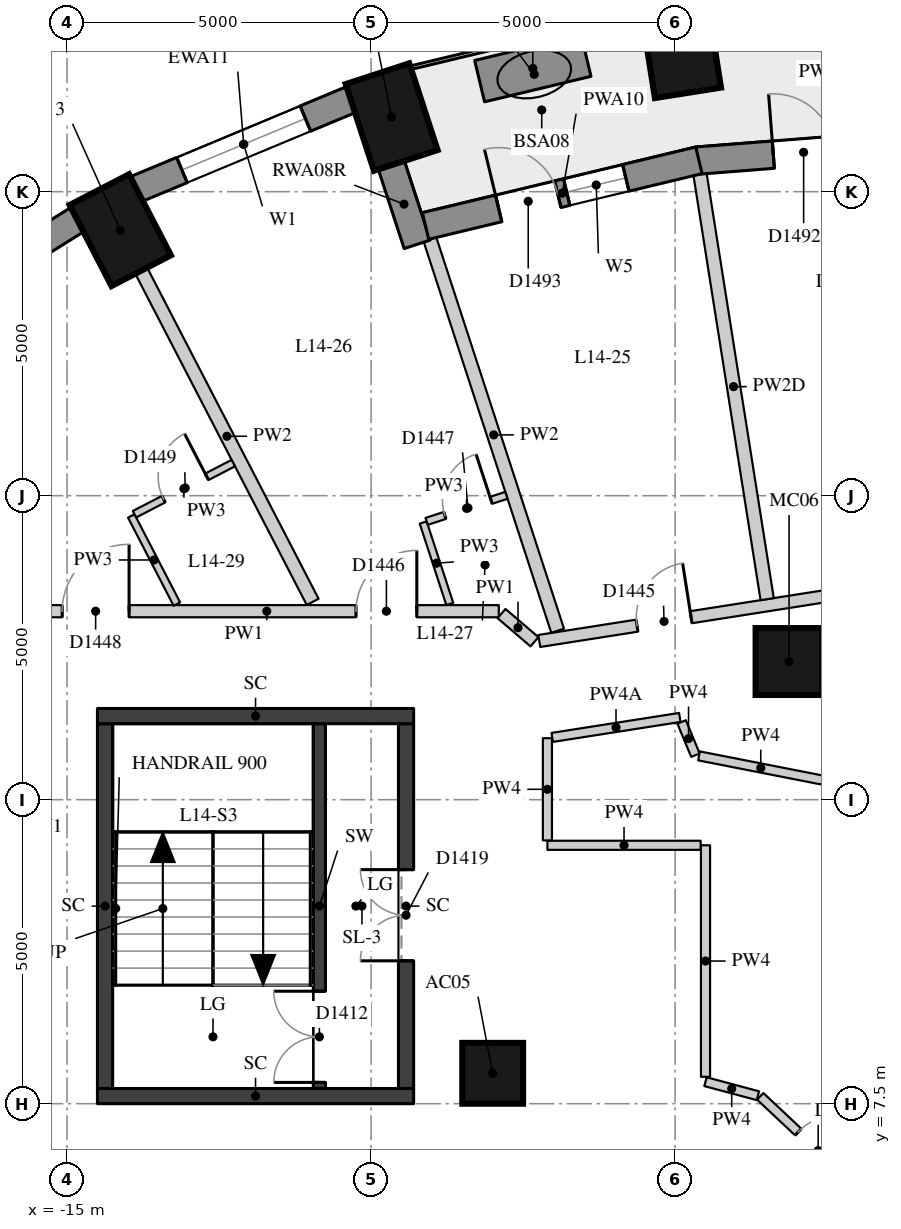
"""IFC4 building model, lengths in metres.
Left out: names, types, materials, properties, quantities, classifications, styles, units other than length and angle.
Written with IfcOpenShell. Run it as: python <this file> out.ifc"""

import sys

from ifc_helpers import new_model, si_unit, direction, frame, frame_2d, origin, origin_2d, place, context, subcontext, project, spatial, rectangle, extrude, element, fill, save


model = new_model("IFC4")
c1 = context("Model", 3, precision=1e-05, world=origin(), true_north=direction((0.0, 1.0)))
c2 = subcontext(c1, "Body", "Model", "MODEL_VIEW")
j1 = project(units=[si_unit("LENGTHUNIT", "METRE"), si_unit("PLANEANGLEUNIT", "RADIAN")], contexts=[c1])
p1 = place(None, origin())
s1 = spatial("IfcSite", under=j1, at=p1, CompositionType="ELEMENT")
p2 = place(p1, origin())
s2 = spatial("IfcBuilding", under=s1, at=p2, CompositionType="ELEMENT")
p3 = place(p2, frame((0.0, 0.0, 54.7)))
s3 = spatial("IfcBuildingStorey", under=s2, at=p3, CompositionType="ELEMENT", Elevation=54.7)
for number, where, z_axis, x_axis in (
    (1, (-4.906, 24.866, 0.0), (0.0, 0.0, 1.0), (-0.156, 0.988, 0.0)),
    (2, (-9.662, 23.727, 0.0), (0.0, 0.0, 1.0), (-0.31, 0.951, 0.0)),
    (3, (-14.125, 21.867, 0.0), (0.0, 0.0, 1.0), (-0.46, 0.888, 0.0)),
):
    element("IfcColumn", number, at=place(p3, frame(where, z_axis=z_axis, x_axis=x_axis)), inside=s3, PredefinedType="COLUMN", context=c2, shape_type="SweptSolid", body=[
        extrude(rectangle(XDim=1.5, YDim=1.1, at=origin_2d()), origin(), (0.0, 0.0, 1.0), 3.3),
    ])
p4 = place(p3, frame((-8.0, 8.0, 0.0), z_axis=(0.0, 0.0, 1.0), x_axis=(1.0, 0.0, 0.0)))
e4 = element("IfcColumn", 4, at=p4, inside=s3, PredefinedType="COLUMN", context=c2, shape_type="SweptSolid", body=[
    extrude(rectangle(XDim=1.0, YDim=1.0, at=origin_2d()), origin(), (0.0, 0.0, 1.0), 3.3),
])
p5 = place(p3, frame((-3.126, 14.772, 0.0), z_axis=(0.0, 0.0, 1.0), x_axis=(1.0, 0.0, 0.0)))
e5 = element("IfcColumn", 5, at=p5, inside=s3, PredefinedType="COLUMN", context=c2, shape_type="SweptSolid", body=[
    extrude(rectangle(XDim=1.1, YDim=1.1, at=origin_2d()), origin(), (0.0, 0.0, 1.0), 3.3),
])
p6 = place(p3, frame((-10.315, 24.021, 0.0), z_axis=(0.0, 0.0, 1.0), x_axis=(-0.923031964282, -0.384723267966, 0.0)))
e6 = element("IfcWall", 6, at=p6, inside=s3, PredefinedType="SOLIDWALL", context=c2, shape_type="SweptSolid", body=[
    extrude(rectangle(XDim=3.856, YDim=0.45, at=frame_2d((1.928, 0.0))), origin(), (0.0, 0.0, 1.0), 3.02),
])
p7 = place(p6, frame((0.828, 0.0, 0.4)))
e7 = element("IfcOpeningElement", 7, at=p7, cuts=e6, PredefinedType="OPENING", context=c2, shape_type="SweptSolid", body=[
    extrude(rectangle(XDim=2.2, YDim=1.75, at=frame_2d((1.1, 0.875))), frame((0.0, 0.235, 0.0), z_axis=(0.0, -1.0, 0.0), x_axis=(1.0, 0.0, 0.0)), (0.0, 0.0, 1.0), 0.47),
])
p8 = place(p3, frame((-14.817, 22.051, 0.0), z_axis=(0.0, 0.0, 1.0), x_axis=(-0.847635480093, -0.530579016629, 0.0)))
e8 = element("IfcWall", 8, at=p8, inside=s3, PredefinedType="SOLIDWALL", context=c2, shape_type="SweptSolid", body=[
    extrude(rectangle(XDim=3.782, YDim=0.45, at=frame_2d((1.891, 0.0))), origin(), (0.0, 0.0, 1.0), 3.02),
])
p9 = place(p8, frame((0.791, 0.0, 0.4)))
e9 = element("IfcOpeningElement", 9, at=p9, cuts=e8, PredefinedType="OPENING", context=c2, shape_type="SweptSolid", body=[
    extrude(rectangle(XDim=2.2, YDim=1.75, at=frame_2d((1.1, 0.875))), frame((0.0, 0.235, 0.0), z_axis=(0.0, -1.0, 0.0), x_axis=(1.0, 0.0, 0.0)), (0.0, 0.0, 1.0), 0.47),
])
p10 = place(p3, frame((-9.674, 22.956, 0.0), z_axis=(0.0, 0.0, 1.0), x_axis=(0.310269011655, -0.950648799719, 0.0)))
e10 = element("IfcWall", 10, at=p10, inside=s3, PredefinedType="SOLIDWALL", context=c2, shape_type="SweptSolid", body=[
    extrude(rectangle(XDim=1.39, YDim=0.45, at=frame_2d((0.695, 0.0))), origin(), (0.0, 0.0, 1.0), 3.02),
])
p11 = place(p3, frame((0.018, 23.376, 0.0), z_axis=(0.0, 0.0, 1.0), x_axis=(-0.996935982964, -0.078221773648, 0.0)))
e11 = element("IfcWall", 11, at=p11, inside=s3, PredefinedType="SOLIDWALL", context=c2, shape_type="SweptSolid", body=[
    extrude(rectangle(XDim=4.676, YDim=0.45, at=frame_2d((2.338, 0.0))), origin(), (0.0, 0.0, 1.0), 3.02),
])
p12 = place(p11, frame((1.263, 0.0, 0.4)))
e12 = element("IfcOpeningElement", 12, at=p12, cuts=e11, PredefinedType="OPENING", context=c2, shape_type="SweptSolid", body=[
    extrude(rectangle(XDim=1.0, YDim=1.75, at=frame_2d((0.5, 0.875))), frame((0.0, 0.235, 0.0), z_axis=(0.0, -1.0, 0.0), x_axis=(1.0, 0.0, 0.0)), (0.0, 0.0, 1.0), 0.47),
])
p13 = place(p11, frame((2.413, 0.0, 0.0)))
e13 = element("IfcOpeningElement", 13, at=p13, cuts=e11, PredefinedType="OPENING", context=c2, shape_type="SweptSolid", body=[
    extrude(rectangle(XDim=1.0, YDim=2.15, at=frame_2d((0.5, 1.075))), frame((0.0, 0.235, 0.0), z_axis=(0.0, -1.0, 0.0), x_axis=(1.0, 0.0, 0.0)), (0.0, 0.0, 1.0), 0.47),
])
p14 = place(p3, frame((-4.608, 23.016, 0.0), z_axis=(0.0, 0.0, 1.0), x_axis=(-0.972343667289, -0.233554688847, 0.0)))
e14 = element("IfcWall", 14, at=p14, inside=s3, PredefinedType="SOLIDWALL", context=c2, shape_type="SweptSolid", body=[
    extrude(rectangle(XDim=4.624, YDim=0.45, at=frame_2d((2.312, 0.0))), origin(), (0.0, 0.0, 1.0), 3.02),
])
p15 = place(p14, frame((1.237, 0.0, 0.4)))
e15 = element("IfcOpeningElement", 15, at=p15, cuts=e14, PredefinedType="OPENING", context=c2, shape_type="SweptSolid", body=[
    extrude(rectangle(XDim=1.0, YDim=1.75, at=frame_2d((0.5, 0.875))), frame((0.0, 0.235, 0.0), z_axis=(0.0, -1.0, 0.0), x_axis=(1.0, 0.0, 0.0)), (0.0, 0.0, 1.0), 0.47),
])
p16 = place(p14, frame((2.387, 0.0, 0.0)))
e16 = element("IfcOpeningElement", 16, at=p16, cuts=e14, PredefinedType="OPENING", context=c2, shape_type="SweptSolid", body=[
    extrude(rectangle(XDim=1.0, YDim=2.15, at=frame_2d((0.5, 1.075))), frame((0.0, 0.235, 0.0), z_axis=(0.0, -1.0, 0.0), x_axis=(1.0, 0.0, 0.0)), (0.0, 0.0, 1.0), 0.47),
])
p17 = place(p3, frame((-6.465, 24.737, 0.0), z_axis=(0.0, 0.0, 1.0), x_axis=(-0.972504142103, -0.232885580473, 0.0)))
e17 = element("IfcWall", 17, at=p17, inside=s3, PredefinedType="USERDEFINED", context=c2, shape_type="SweptSolid", body=[
    extrude(rectangle(XDim=1.8, YDim=0.7, at=frame_2d((0.9, 0.0))), origin(), (0.0, 0.0, 1.0), 0.75),
])
p18 = place(p3, frame((-10.85, 7.75, 0.0), z_axis=(0.0, 0.0, 1.0), x_axis=(0.0, 1.0, 0.0)))
e18 = element("IfcWall", 18, at=p18, inside=s3, PredefinedType="SHEAR", context=c2, shape_type="SweptSolid", body=[
    extrude(rectangle(XDim=6.0, YDim=0.2, at=frame_2d((3.0, 0.0))), origin(), (0.0, 0.0, 1.0), 3.02),
])
p19 = place(p18, frame((0.1, 0.0, 0.0)))
e19 = element("IfcOpeningElement", 19, at=p19, cuts=e18, PredefinedType="OPENING", context=c2, shape_type="SweptSolid", body=[
    extrude(rectangle(XDim=1.5, YDim=2.1, at=frame_2d((0.75, 1.05))), frame((0.0, 0.11, 0.0), z_axis=(0.0, -1.0, 0.0), x_axis=(1.0, 0.0, 0.0)), (0.0, 0.0, 1.0), 0.22),
])
p20 = place(p3, frame((-14.375, 7.75, -0.28), z_axis=(0.0, 0.0, 1.0), x_axis=(0.0, 1.0, 0.0)))
e20 = element("IfcWall", 20, at=p20, inside=s3, PredefinedType="SHEAR", context=c2, shape_type="SweptSolid", body=[
    extrude(rectangle(XDim=6.0, YDim=0.25, at=frame_2d((3.0, 0.0))), origin(), (0.0, 0.0, 1.0), 3.3),
])
p21 = place(p3, frame((-9.425, 7.75, -0.28), z_axis=(0.0, 0.0, 1.0), x_axis=(0.0, 1.0, 0.0)))
e21 = element("IfcWall", 21, at=p21, inside=s3, PredefinedType="SHEAR", context=c2, shape_type="SweptSolid", body=[
    extrude(rectangle(XDim=6.0, YDim=0.25, at=frame_2d((3.0, 0.0))), origin(), (0.0, 0.0, 1.0), 3.3),
])
p22 = place(p21, frame((2.1, 0.0, 0.28)))
e22 = element("IfcOpeningElement", 22, at=p22, cuts=e21, PredefinedType="OPENING", context=c2, shape_type="SweptSolid", body=[
    extrude(rectangle(XDim=1.5, YDim=2.1, at=frame_2d((0.75, 1.05))), frame((0.0, 0.135, 0.0), z_axis=(0.0, -1.0, 0.0), x_axis=(1.0, 0.0, 0.0)), (0.0, 0.0, 1.0), 0.27),
])
for number, where, z_axis, x_axis in (
    (23, (-14.5, 13.875, -0.28), (0.0, 0.0, 1.0), (1.0, 0.0, 0.0)),
    (24, (-14.5, 7.625, -0.28), (0.0, 0.0, 1.0), (1.0, 0.0, 0.0)),
):
    element("IfcWall", number, at=place(p3, frame(where, z_axis=z_axis, x_axis=x_axis)), inside=s3, PredefinedType="SHEAR", context=c2, shape_type="SweptSolid", body=[
        extrude(rectangle(XDim=5.2, YDim=0.25, at=frame_2d((2.6, 0.0))), origin(), (0.0, 0.0, 1.0), 3.3),
    ])
p23 = place(p3, frame((-15.531, 15.6, 0.0), z_axis=(0.0, 0.0, 1.0), x_axis=(1.0, 0.0, 0.0)))
e25 = element("IfcWall", 25, at=p23, inside=s3, PredefinedType="PARTITIONING", context=c2, shape_type="SweptSolid", body=[
    extrude(rectangle(XDim=7.632, YDim=0.2, at=frame_2d((3.816, 0.0))), origin(), (0.0, 0.0, 1.0), 3.02),
])
p24 = place(p23, frame((5.283, 0.0, 0.0)))
e26 = element("IfcOpeningElement", 26, at=p24, cuts=e25, PredefinedType="OPENING", context=c2, shape_type="SweptSolid", body=[
    extrude(rectangle(XDim=1.0, YDim=2.1, at=frame_2d((0.5, 1.05))), frame((0.0, 0.11, 0.0), z_axis=(0.0, -1.0, 0.0), x_axis=(1.0, 0.0, 0.0)), (0.0, 0.0, 1.0), 0.22),
])
p25 = place(p23, frame((0.451, 0.0, 0.0)))
e27 = element("IfcOpeningElement", 27, at=p25, cuts=e25, PredefinedType="OPENING", context=c2, shape_type="SweptSolid", body=[
    extrude(rectangle(XDim=1.1, YDim=2.1, at=frame_2d((0.55, 1.05))), frame((0.0, 0.11, 0.0), z_axis=(0.0, -1.0, 0.0), x_axis=(1.0, 0.0, 0.0)), (0.0, 0.0, 1.0), 0.22),
])
p26 = place(p3, frame((-7.854, 15.561, 0.0), z_axis=(0.0, 0.0, 1.0), x_axis=(0.759763914627, -0.650199041856, 0.0)))
e28 = element("IfcWall", 28, at=p26, inside=s3, PredefinedType="PARTITIONING", context=c2, shape_type="SweptSolid", body=[
    extrude(rectangle(XDim=0.713, YDim=0.2, at=frame_2d((0.356, 0.0))), origin(), (0.0, 0.0, 1.0), 3.02),
])
p27 = place(p3, frame((-7.234, 15.11, 0.0), z_axis=(0.0, 0.0, 1.0), x_axis=(0.987957763282, 0.154723811906, 0.0)))
e29 = element("IfcWall", 29, at=p27, inside=s3, PredefinedType="PARTITIONING", context=c2, shape_type="SweptSolid", body=[
    extrude(rectangle(XDim=11.012, YDim=0.2, at=frame_2d((5.506, 0.0))), origin(), (0.0, 0.0, 1.0), 3.02),
])
p28 = place(p27, frame((8.605, 0.0, 0.0)))
e30 = element("IfcOpeningElement", 30, at=p28, cuts=e29, PredefinedType="OPENING", context=c2, shape_type="SweptSolid", body=[
    extrude(rectangle(XDim=0.9, YDim=2.1, at=frame_2d((0.45, 1.05))), frame((0.0, 0.11, 0.0), z_axis=(0.0, -1.0, 0.0), x_axis=(1.0, 0.0, 0.0)), (0.0, 0.0, 1.0), 0.22),
])
p29 = place(p27, frame((5.116, 0.0, 0.0)))
e31 = element("IfcOpeningElement", 31, at=p29, cuts=e29, PredefinedType="OPENING", context=c2, shape_type="SweptSolid", body=[
    extrude(rectangle(XDim=0.9, YDim=2.1, at=frame_2d((0.45, 1.05))), frame((0.0, 0.11, 0.0), z_axis=(0.0, -1.0, 0.0), x_axis=(1.0, 0.0, 0.0)), (0.0, 0.0, 1.0), 0.22),
])
p30 = place(p27, frame((1.626, 0.0, 0.0)))
e32 = element("IfcOpeningElement", 32, at=p30, cuts=e29, PredefinedType="OPENING", context=c2, shape_type="SweptSolid", body=[
    extrude(rectangle(XDim=0.9, YDim=2.1, at=frame_2d((0.45, 1.05))), frame((0.0, 0.11, 0.0), z_axis=(0.0, -1.0, 0.0), x_axis=(1.0, 0.0, 0.0)), (0.0, 0.0, 1.0), 0.22),
])
p31 = place(p3, frame((-1.694, 5.832, 0.0), z_axis=(0.0, 0.0, 1.0), x_axis=(-0.729170056034, 0.684332542981, 0.0)))
e33 = element("IfcWall", 33, at=p31, inside=s3, PredefinedType="PARTITIONING", context=c2, shape_type="SweptSolid", body=[
    extrude(rectangle(XDim=2.614, YDim=0.15, at=frame_2d((1.307, 0.0))), origin(), (0.0, 0.0, 1.0), 3.02),
])
p32 = place(p31, frame((0.857, 0.0, 0.0)))
e34 = element("IfcOpeningElement", 34, at=p32, cuts=e33, PredefinedType="OPENING", context=c2, shape_type="SweptSolid", body=[
    extrude(rectangle(XDim=0.9, YDim=2.1, at=frame_2d((0.45, 1.05))), frame((0.0, 0.085, 0.0), z_axis=(0.0, -1.0, 0.0), x_axis=(1.0, 0.0, 0.0)), (0.0, 0.0, 1.0), 0.17),
])
p33 = place(p3, frame((-3.639, 7.631, 0.0), z_axis=(0.0, 0.0, 1.0), x_axis=(-0.965879594242, 0.258991523853, 0.0)))
e35 = element("IfcWall", 35, at=p33, inside=s3, PredefinedType="PARTITIONING", context=c2, shape_type="SweptSolid", body=[
    extrude(rectangle(XDim=0.892, YDim=0.15, at=frame_2d((0.446, 0.0))), origin(), (0.0, 0.0, 1.0), 3.02),
])
p34 = place(p3, frame((-4.5, 7.942, 0.0), z_axis=(0.0, 0.0, 1.0), x_axis=(0.0, 1.0, 0.0)))
e36 = element("IfcWall", 36, at=p34, inside=s3, PredefinedType="PARTITIONING", context=c2, shape_type="SweptSolid", body=[
    extrude(rectangle(XDim=3.808, YDim=0.15, at=frame_2d((1.904, 0.0))), origin(), (0.0, 0.0, 1.0), 3.02),
])
p35 = place(p3, frame((-4.58, 11.75, 0.0), z_axis=(0.0, 0.0, 1.0), x_axis=(-1.0, 0.0, 0.0)))
e37 = element("IfcWall", 37, at=p35, inside=s3, PredefinedType="PARTITIONING", context=c2, shape_type="SweptSolid", body=[
    extrude(rectangle(XDim=2.52, YDim=0.15, at=frame_2d((1.26, 0.0))), origin(), (0.0, 0.0, 1.0), 3.02),
])
p36 = place(p3, frame((-7.1, 11.83, 0.0), z_axis=(0.0, 0.0, 1.0), x_axis=(0.0, 1.0, 0.0)))
e38 = element("IfcWall", 38, at=p36, inside=s3, PredefinedType="PARTITIONING", context=c2, shape_type="SweptSolid", body=[
    extrude(rectangle(XDim=1.681, YDim=0.15, at=frame_2d((0.841, 0.0))), origin(), (0.0, 0.0, 1.0), 3.02),
])
p37 = place(p3, frame((-7.021, 13.524, 0.0), z_axis=(0.0, 0.0, 1.0), x_axis=(0.987976394461, 0.154604799366, 0.0)))
e39 = element("IfcWall", 39, at=p37, inside=s3, PredefinedType="PARTITIONING", context=c2, shape_type="SweptSolid", body=[
    extrude(rectangle(XDim=2.124, YDim=0.15, at=frame_2d((1.062, 0.0))), origin(), (0.0, 0.0, 1.0), 2.57),
])
p38 = place(p3, frame((-4.892, 13.778, 0.0), z_axis=(0.0, 0.0, 1.0), x_axis=(0.383178293395, -0.923674399056, 0.0)))
e40 = element("IfcWall", 40, at=p38, inside=s3, PredefinedType="PARTITIONING", context=c2, shape_type="SweptSolid", body=[
    extrude(rectangle(XDim=0.591, YDim=0.15, at=frame_2d((0.296, 0.0))), origin(), (0.0, 0.0, 1.0), 3.02),
])
p39 = place(p3, frame((-4.607, 13.22, 0.0), z_axis=(0.0, 0.0, 1.0), x_axis=(0.981304142817, -0.192463449234, 0.0)))
e41 = element("IfcWall", 41, at=p39, inside=s3, PredefinedType="PARTITIONING", context=c2, shape_type="SweptSolid", body=[
    extrude(rectangle(XDim=2.07, YDim=0.15, at=frame_2d((1.035, 0.0))), origin(), (0.0, 0.0, 1.0), 3.02),
])
p40 = place(p3, frame((-4.591, 22.789, 0.0), z_axis=(0.0, 0.0, 1.0), x_axis=(0.15613617795, -0.987735538459, 0.0)))
e42 = element("IfcWall", 42, at=p40, inside=s3, PredefinedType="PARTITIONING", context=c2, shape_type="SweptSolid", body=[
    extrude(rectangle(XDim=7.077, YDim=0.22, at=frame_2d((3.539, 0.0))), origin(), (0.0, 0.0, 1.0), 2.47),
])
p41 = place(p3, frame((-9.034, 21.721, 0.0), z_axis=(0.0, 0.0, 1.0), x_axis=(0.310212430052, -0.950667264736, 0.0)))
e43 = element("IfcWall", 43, at=p41, inside=s3, PredefinedType="PARTITIONING", context=c2, shape_type="SweptSolid", body=[
    extrude(rectangle(XDim=6.777, YDim=0.22, at=frame_2d((3.388, 0.0))), origin(), (0.0, 0.0, 1.0), 3.02),
])
p42 = place(p3, frame((-13.78, 21.201, 0.0), z_axis=(0.0, 0.0, 1.0), x_axis=(0.459699000582, -0.888074787878, 0.0)))
e44 = element("IfcWall", 44, at=p42, inside=s3, PredefinedType="PARTITIONING", context=c2, shape_type="SweptSolid", body=[
    extrude(rectangle(XDim=6.134, YDim=0.22, at=frame_2d((3.067, 0.0))), origin(), (0.0, 0.0, 1.0), 3.02),
])
p43 = place(p3, frame((-8.706, 15.719, 0.0), z_axis=(0.0, 0.0, 1.0), x_axis=(-0.310245242974, 0.950656556918, 0.0)))
e45 = element("IfcWall", 45, at=p43, inside=s3, PredefinedType="PARTITIONING", context=c2, shape_type="SweptSolid", body=[
    extrude(rectangle(XDim=1.409, YDim=0.12, at=frame_2d((0.705, 0.0))), origin(), (0.0, 0.0, 1.0), 3.02),
])
p44 = place(p3, frame((-13.194, 15.718, 0.0), z_axis=(0.0, 0.0, 1.0), x_axis=(-0.459736274936, 0.888055492359, 0.0)))
e46 = element("IfcWall", 46, at=p44, inside=s3, PredefinedType="PARTITIONING", context=c2, shape_type="SweptSolid", body=[
    extrude(rectangle(XDim=1.632, YDim=0.12, at=frame_2d((0.816, 0.0))), origin(), (0.0, 0.0, 1.0), 3.02),
])
p45 = place(p3, frame((-9.086, 17.077, 0.0), z_axis=(0.0, 0.0, 1.0), x_axis=(0.950576687533, 0.310489872812, 0.0)))
e47 = element("IfcWall", 47, at=p45, inside=s3, PredefinedType="PARTITIONING", context=c2, shape_type="SweptSolid", body=[
    extrude(rectangle(XDim=1.38, YDim=0.12, at=frame_2d((0.69, 0.0))), origin(), (0.0, 0.0, 1.0), 3.02),
])
p46 = place(p45, frame((0.315, 0.0, 0.0)))
e48 = element("IfcOpeningElement", 48, at=p46, cuts=e47, PredefinedType="OPENING", context=c2, shape_type="SweptSolid", body=[
    extrude(rectangle(XDim=0.8, YDim=2.1, at=frame_2d((0.4, 1.05))), frame((0.0, 0.07, 0.0), z_axis=(0.0, -1.0, 0.0), x_axis=(1.0, 0.0, 0.0)), (0.0, 0.0, 1.0), 0.14),
])
p47 = place(p3, frame((-13.891, 17.195, 0.0), z_axis=(0.0, 0.0, 1.0), x_axis=(0.88806930088, 0.459709600546, 0.0)))
e49 = element("IfcWall", 49, at=p47, inside=s3, PredefinedType="PARTITIONING", context=c2, shape_type="SweptSolid", body=[
    extrude(rectangle(XDim=1.83, YDim=0.12, at=frame_2d((0.915, 0.0))), origin(), (0.0, 0.0, 1.0), 3.02),
])
p48 = place(p47, frame((0.54, 0.0, 0.0)))
e50 = element("IfcOpeningElement", 50, at=p48, cuts=e49, PredefinedType="OPENING", context=c2, shape_type="SweptSolid", body=[
    extrude(rectangle(XDim=0.8, YDim=2.1, at=frame_2d((0.4, 1.05))), frame((0.0, 0.07, 0.0), z_axis=(0.0, -1.0, 0.0), x_axis=(1.0, 0.0, 0.0)), (0.0, 0.0, 1.0), 0.14),
])
p49 = place(p7, origin())
e51 = element("IfcWindow", 51, at=p49, inside=s3, PartitioningType="SINGLE_PANEL", PredefinedType="WINDOW", context=c2, shape_type="SweptSolid", body=[
    extrude(rectangle(XDim=2.2, YDim=1.75, at=frame_2d((1.1, 0.875))), frame((0.0, 0.035, 0.0), z_axis=(0.0, -1.0, 0.0), x_axis=(1.0, 0.0, 0.0)), (0.0, 0.0, 1.0), 0.06),
])
fill(e7, e51)
p50 = place(p13, frame((1.0, 0.0, 0.0), z_axis=(0.0, 0.0, 1.0), x_axis=(-1.0, 0.0, 0.0)))
e52 = element("IfcDoor", 52, at=p50, inside=s3, OperationType="SINGLE_SWING_LEFT", PredefinedType="DOOR", context=c2, shape_type="SweptSolid", body=[
    extrude(rectangle(XDim=1.0, YDim=2.15, at=frame_2d((0.5, 1.075))), frame((0.0, 0.075, 0.0), z_axis=(0.0, -1.0, 0.0), x_axis=(1.0, 0.0, 0.0)), (0.0, 0.0, 1.0), 0.05),
])
fill(e13, e52)
p51 = place(p15, origin())
e53 = element("IfcWindow", 53, at=p51, inside=s3, PartitioningType="SINGLE_PANEL", PredefinedType="WINDOW", context=c2, shape_type="SweptSolid", body=[
    extrude(rectangle(XDim=1.0, YDim=1.75, at=frame_2d((0.5, 0.875))), frame((0.0, 0.035, 0.0), z_axis=(0.0, -1.0, 0.0), x_axis=(1.0, 0.0, 0.0)), (0.0, 0.0, 1.0), 0.06),
])
fill(e15, e53)
p52 = place(p16, frame((1.0, 0.0, 0.0), z_axis=(0.0, 0.0, 1.0), x_axis=(-1.0, 0.0, 0.0)))
e54 = element("IfcDoor", 54, at=p52, inside=s3, OperationType="SINGLE_SWING_LEFT", PredefinedType="DOOR", context=c2, shape_type="SweptSolid", body=[
    extrude(rectangle(XDim=1.0, YDim=2.15, at=frame_2d((0.5, 1.075))), frame((0.0, 0.075, 0.0), z_axis=(0.0, -1.0, 0.0), x_axis=(1.0, 0.0, 0.0)), (0.0, 0.0, 1.0), 0.05),
])
fill(e16, e54)
p53 = place(p19, origin())
e55 = element("IfcDoor", 55, at=p53, inside=s3, OperationType="DOUBLE_DOOR_SINGLE_SWING", PredefinedType="DOOR", context=c2, shape_type="SweptSolid", body=[
    extrude(rectangle(XDim=1.5, YDim=2.1, at=frame_2d((0.75, 1.05))), frame((0.0, 0.025, 0.0), z_axis=(0.0, -1.0, 0.0), x_axis=(1.0, 0.0, 0.0)), (0.0, 0.0, 1.0), 0.05),
])
fill(e19, e55)
p54 = place(p22, origin())
e56 = element("IfcDoor", 56, at=p54, inside=s3, OperationType="DOUBLE_DOOR_SINGLE_SWING", PredefinedType="DOOR", context=c2, shape_type="SweptSolid", body=[
    extrude(rectangle(XDim=1.5, YDim=2.1, at=frame_2d((0.75, 1.05))), frame((0.0, 0.025, 0.0), z_axis=(0.0, -1.0, 0.0), x_axis=(1.0, 0.0, 0.0)), (0.0, 0.0, 1.0), 0.05),
])
fill(e22, e56)
p55 = place(p30, origin())
e57 = element("IfcDoor", 57, at=p55, inside=s3, OperationType="SINGLE_SWING_RIGHT", PredefinedType="DOOR", context=c2, shape_type="SweptSolid", body=[
    extrude(rectangle(XDim=0.9, YDim=2.1, at=frame_2d((0.45, 1.05))), frame((0.0, 0.025, 0.0), z_axis=(0.0, -1.0, 0.0), x_axis=(1.0, 0.0, 0.0)), (0.0, 0.0, 1.0), 0.05),
])
fill(e32, e57)
p56 = place(p24, origin())
e58 = element("IfcDoor", 58, at=p56, inside=s3, OperationType="SINGLE_SWING_RIGHT", PredefinedType="DOOR", context=c2, shape_type="SweptSolid", body=[
    extrude(rectangle(XDim=1.0, YDim=2.1, at=frame_2d((0.5, 1.05))), frame((0.0, 0.025, 0.0), z_axis=(0.0, -1.0, 0.0), x_axis=(1.0, 0.0, 0.0)), (0.0, 0.0, 1.0), 0.05),
])
fill(e26, e58)
p57 = place(p46, origin())
e59 = element("IfcDoor", 59, at=p57, inside=s3, OperationType="SINGLE_SWING_RIGHT", PredefinedType="DOOR", context=c2, shape_type="SweptSolid", body=[
    extrude(rectangle(XDim=0.8, YDim=2.1, at=frame_2d((0.4, 1.05))), frame((0.0, 0.025, 0.0), z_axis=(0.0, -1.0, 0.0), x_axis=(1.0, 0.0, 0.0)), (0.0, 0.0, 1.0), 0.05),
])
fill(e48, e59)
p58 = place(p25, origin())
e60 = element("IfcDoor", 60, at=p58, inside=s3, OperationType="SINGLE_SWING_RIGHT", PredefinedType="DOOR", context=c2, shape_type="SweptSolid", body=[
    extrude(rectangle(XDim=1.1, YDim=2.1, at=frame_2d((0.55, 1.05))), frame((0.0, 0.025, 0.0), z_axis=(0.0, -1.0, 0.0), x_axis=(1.0, 0.0, 0.0)), (0.0, 0.0, 1.0), 0.05),
])
fill(e27, e60)
p59 = place(p48, origin())
e61 = element("IfcDoor", 61, at=p59, inside=s3, OperationType="SINGLE_SWING_RIGHT", PredefinedType="DOOR", context=c2, shape_type="SweptSolid", body=[
    extrude(rectangle(XDim=0.8, YDim=2.1, at=frame_2d((0.4, 1.05))), frame((0.0, 0.025, 0.0), z_axis=(0.0, -1.0, 0.0), x_axis=(1.0, 0.0, 0.0)), (0.0, 0.0, 1.0), 0.05),
])
fill(e50, e61)
p60 = place(p32, origin())
e62 = element("IfcDoor", 62, at=p60, inside=s3, OperationType="SINGLE_SWING_RIGHT", PredefinedType="DOOR", context=c2, shape_type="SweptSolid", body=[
    extrude(rectangle(XDim=0.9, YDim=2.1, at=frame_2d((0.45, 1.05))), frame((0.0, 0.025, 0.0), z_axis=(0.0, -1.0, 0.0), x_axis=(1.0, 0.0, 0.0)), (0.0, 0.0, 1.0), 0.05),
])
fill(e34, e62)
save(model, sys.argv[1])
